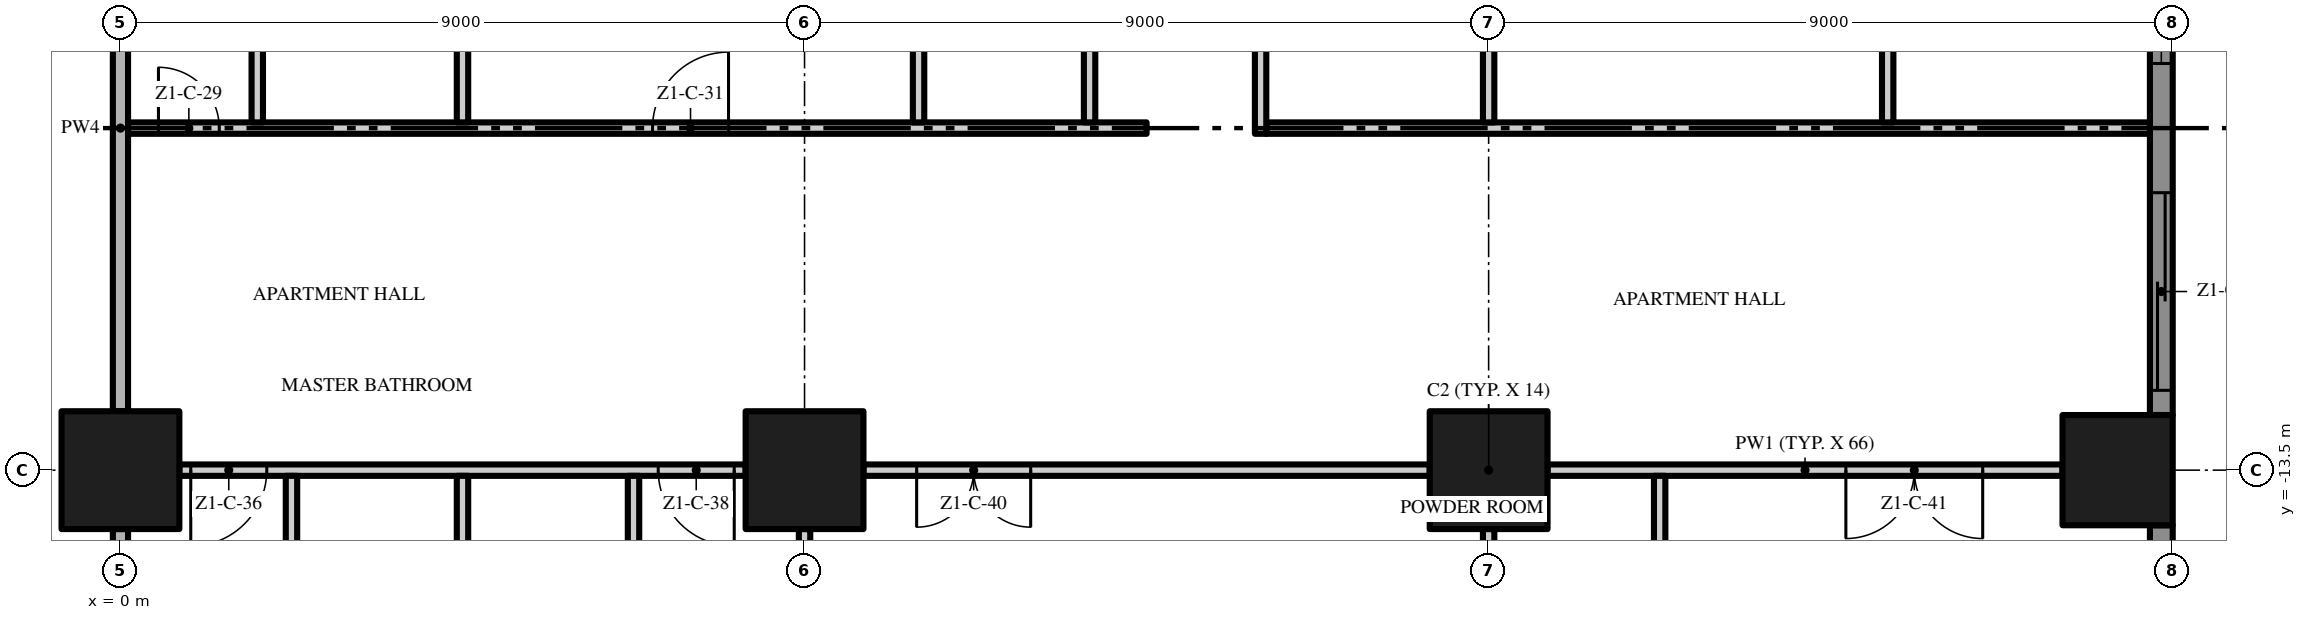
"""IFC4 building model, lengths in metres.
Left out: names, types, materials, properties, quantities, classifications, styles, units other than length and angle.
Written with IfcOpenShell. Run it as: python <this file> out.ifc"""

import sys

from ifc_helpers import new_model, si_unit, direction, frame, frame_2d, origin, origin_2d, place, context, subcontext, project, spatial, polyline, rectangle, outline, extrude, element, fill, save


model = new_model("IFC4")
c1 = context("Model", 3, precision=1e-05, world=origin(), true_north=direction((0.0, 1.0)))
c2 = subcontext(c1, "Body", "Model", "MODEL_VIEW")
j1 = project(units=[si_unit("LENGTHUNIT", "METRE"), si_unit("PLANEANGLEUNIT", "RADIAN")], contexts=[c1])
p1 = place(None, origin())
s1 = spatial("IfcSite", under=j1, at=p1, CompositionType="ELEMENT")
p2 = place(p1, origin())
s2 = spatial("IfcBuilding", under=s1, at=p2, CompositionType="ELEMENT")
p3 = place(p2, frame((0.0, 0.0, 37.8)))
s3 = spatial("IfcBuildingStorey", under=s2, at=p3, CompositionType="ELEMENT", Elevation=37.8)
for number, where, z_axis, x_axis in (
    (1, (0.0, -13.5, 0.0), (0.0, 0.0, 1.0), (1.0, 0.0, 0.0)),
    (2, (18.0, -13.5, 0.0), (0.0, 0.0, 1.0), (1.0, 0.0, 0.0)),
):
    element("IfcColumn", number, at=place(p3, frame(where, z_axis=z_axis, x_axis=x_axis)), inside=s3, PredefinedType="COLUMN", context=c2, shape_type="SweptSolid", body=[
        extrude(rectangle(XDim=1.55, YDim=1.55, at=origin_2d()), origin(), (0.0, 0.0, 1.0), 3.5),
    ])
p4 = place(p3, frame((26.275, -13.5, 0.0), z_axis=(0.0, 0.0, 1.0), x_axis=(1.0, 0.0, 0.0)))
e3 = element("IfcColumn", 3, at=p4, inside=s3, PredefinedType="COLUMN", context=c2, shape_type="SweptSolid", body=[
    extrude(rectangle(XDim=1.45, YDim=1.45, at=origin_2d()), origin(), (0.0, 0.0, 1.0), 3.5),
])
p5 = place(p3, frame((9.0, -13.5, 0.0), z_axis=(0.0, 0.0, 1.0), x_axis=(1.0, 0.0, 0.0)))
e4 = element("IfcColumn", 4, at=p5, inside=s3, PredefinedType="COLUMN", context=c2, shape_type="SweptSolid", body=[
    extrude(rectangle(XDim=1.55, YDim=1.55, at=origin_2d()), origin(), (0.0, 0.0, 1.0), 3.5),
])
p6 = place(p3, frame((26.85, -14.225, 0.0), z_axis=(0.0, 0.0, 1.0), x_axis=(0.0, -1.0, 0.0)))
e5 = element("IfcWall", 5, at=p6, inside=s3, PredefinedType="SOLIDWALL", context=c2, shape_type="SweptSolid", body=[
    extrude(rectangle(XDim=3.475, YDim=0.3, at=frame_2d((1.738, 0.0))), origin(), (0.0, 0.0, 1.0), 3.5),
])
p7 = place(p6, frame((0.325, 0.0, 0.45)))
e6 = element("IfcOpeningElement", 6, at=p7, cuts=e5, PredefinedType="OPENING", context=c2, shape_type="SweptSolid", body=[
    extrude(rectangle(XDim=2.6, YDim=2.65, at=frame_2d((1.3, 1.325))), frame((0.0, 0.16, 0.0), z_axis=(0.0, -1.0, 0.0), x_axis=(1.0, 0.0, 0.0)), (0.0, 0.0, 1.0), 0.32),
])
p8 = place(p3, frame((26.85, -5.225, 0.0), z_axis=(0.0, 0.0, 1.0), x_axis=(0.0, -1.0, 0.0)))
e7 = element("IfcWall", 7, at=p8, inside=s3, PredefinedType="SOLIDWALL", context=c2, shape_type="SweptSolid", body=[
    extrude(rectangle(XDim=7.55, YDim=0.3, at=frame_2d((3.775, 0.0))), origin(), (0.0, 0.0, 1.0), 3.5),
])
p9 = place(p8, frame((4.625, 0.0, 0.0)))
e8 = element("IfcOpeningElement", 8, at=p9, cuts=e7, PredefinedType="OPENING", context=c2, shape_type="SweptSolid", body=[
    extrude(rectangle(XDim=2.6, YDim=2.4, at=frame_2d((1.3, 1.2))), frame((0.0, 0.16, 0.0), z_axis=(0.0, -1.0, 0.0), x_axis=(1.0, 0.0, 0.0)), (0.0, 0.0, 1.0), 0.32),
])
p10 = place(p8, frame((0.325, 0.0, 0.45)))
e9 = element("IfcOpeningElement", 9, at=p10, cuts=e7, PredefinedType="OPENING", context=c2, shape_type="SweptSolid", body=[
    extrude(rectangle(XDim=2.6, YDim=2.65, at=frame_2d((1.3, 1.325))), frame((0.0, 0.16, 0.0), z_axis=(0.0, -1.0, 0.0), x_axis=(1.0, 0.0, 0.0)), (0.0, 0.0, 1.0), 0.32),
])
p11 = place(p3, origin())
e10 = element("IfcWall", 10, at=p11, inside=s3, PredefinedType="USERDEFINED", context=c2, shape_type="SweptSolid", body=[
    extrude(outline(polyline([(27.6, -18.0), (27.829, -16.5), (28.429, -15.0), (29.171, -13.5), (29.771, -12.0), (30.0, -10.5), (29.771, -9.0), (29.171, -7.5), (28.429, -6.0), (27.829, -4.5), (27.6, -3.0), (27.829, -1.5), (28.429, 0.0), (29.171, 1.5), (29.771, 3.0), (30.0, 4.5), (29.771, 6.0), (29.171, 7.5), (28.429, 9.0), (27.829, 10.5), (27.6, 12.0), (27.829, 13.5), (28.429, 15.0), (29.171, 16.5), (29.771, 18.0), (29.539, 18.093), (28.942, 16.602), (28.201, 15.102), (27.586, 13.566), (27.347, 12.0), (27.586, 10.434), (28.201, 8.898), (28.942, 7.398), (29.528, 5.934), (29.747, 4.5), (29.528, 3.066), (28.942, 1.602), (28.201, 0.102), (27.586, -1.434), (27.347, -3.0), (27.586, -4.566), (28.201, -6.102), (28.942, -7.602), (29.528, -9.066), (29.747, -10.5), (29.528, -11.934), (28.942, -13.398), (28.201, -14.898), (27.586, -16.434), (27.353, -17.962), (27.6, -18.0)])), origin(), (0.0, 0.0, 1.0), 0.9),
])
p12 = place(p3, frame((8.225, -13.5, 0.0), z_axis=(0.0, 0.0, 1.0), x_axis=(-1.0, 0.0, 0.0)))
e11 = element("IfcWall", 11, at=p12, inside=s3, PredefinedType="PARTITIONING", context=c2, shape_type="SweptSolid", body=[
    extrude(rectangle(XDim=7.45, YDim=0.15, at=frame_2d((3.725, 0.0))), origin(), (0.0, 0.0, 1.0), 3.5),
])
p13 = place(p12, frame((6.3, 0.0, 0.0)))
e12 = element("IfcOpeningElement", 12, at=p13, cuts=e11, PredefinedType="OPENING", context=c2, shape_type="SweptSolid", body=[
    extrude(rectangle(XDim=1.0, YDim=2.4, at=frame_2d((0.5, 1.2))), frame((0.0, 0.085, 0.0), z_axis=(0.0, -1.0, 0.0), x_axis=(1.0, 0.0, 0.0)), (0.0, 0.0, 1.0), 0.17),
])
p14 = place(p12, frame((0.15, 0.0, 0.0)))
e13 = element("IfcOpeningElement", 13, at=p14, cuts=e11, PredefinedType="OPENING", context=c2, shape_type="SweptSolid", body=[
    extrude(rectangle(XDim=1.0, YDim=2.4, at=frame_2d((0.5, 1.2))), frame((0.0, 0.085, 0.0), z_axis=(0.0, -1.0, 0.0), x_axis=(1.0, 0.0, 0.0)), (0.0, 0.0, 1.0), 0.17),
])
p15 = place(p3, frame((17.225, -13.5, 0.0), z_axis=(0.0, 0.0, 1.0), x_axis=(-1.0, 0.0, 0.0)))
e14 = element("IfcWall", 14, at=p15, inside=s3, PredefinedType="PARTITIONING", context=c2, shape_type="SweptSolid", body=[
    extrude(rectangle(XDim=7.45, YDim=0.15, at=frame_2d((3.725, 0.0))), origin(), (0.0, 0.0, 1.0), 3.5),
])
p16 = place(p15, frame((5.25, 0.0, 0.0)))
e15 = element("IfcOpeningElement", 15, at=p16, cuts=e14, PredefinedType="OPENING", context=c2, shape_type="SweptSolid", body=[
    extrude(rectangle(XDim=1.5, YDim=2.4, at=frame_2d((0.75, 1.2))), frame((0.0, 0.085, 0.0), z_axis=(0.0, -1.0, 0.0), x_axis=(1.0, 0.0, 0.0)), (0.0, 0.0, 1.0), 0.17),
])
p17 = place(p3, frame((25.55, -13.5, 0.0), z_axis=(0.0, 0.0, 1.0), x_axis=(-1.0, 0.0, 0.0)))
e16 = element("IfcWall", 16, at=p17, inside=s3, PredefinedType="PARTITIONING", context=c2, shape_type="SweptSolid", body=[
    extrude(rectangle(XDim=6.775, YDim=0.15, at=frame_2d((3.388, 0.0))), origin(), (0.0, 0.0, 1.0), 3.5),
])
p18 = place(p17, frame((1.05, 0.0, 0.0)))
e17 = element("IfcOpeningElement", 17, at=p18, cuts=e16, PredefinedType="OPENING", context=c2, shape_type="SweptSolid", body=[
    extrude(rectangle(XDim=1.8, YDim=2.4, at=frame_2d((0.9, 1.2))), frame((0.0, 0.085, 0.0), z_axis=(0.0, -1.0, 0.0), x_axis=(1.0, 0.0, 0.0)), (0.0, 0.0, 1.0), 0.17),
])
p19 = place(p3, frame((0.1, -9.0, 0.0), z_axis=(0.0, 0.0, 1.0), x_axis=(1.0, 0.0, 0.0)))
e18 = element("IfcWall", 18, at=p19, inside=s3, PredefinedType="PARTITIONING", context=c2, shape_type="SweptSolid", body=[
    extrude(rectangle(XDim=13.4, YDim=0.15, at=frame_2d((6.7, 0.0))), origin(), (0.0, 0.0, 1.0), 3.5),
])
p20 = place(p19, frame((0.4, 0.0, 0.0)))
e19 = element("IfcOpeningElement", 19, at=p20, cuts=e18, PredefinedType="OPENING", context=c2, shape_type="SweptSolid", body=[
    extrude(rectangle(XDim=0.8, YDim=2.0, at=frame_2d((0.4, 1.0))), frame((0.0, 0.085, 0.0), z_axis=(0.0, -1.0, 0.0), x_axis=(1.0, 0.0, 0.0)), (0.0, 0.0, 1.0), 0.17),
])
p21 = place(p19, frame((6.9, 0.0, 0.0)))
e20 = element("IfcOpeningElement", 20, at=p21, cuts=e18, PredefinedType="OPENING", context=c2, shape_type="SweptSolid", body=[
    extrude(rectangle(XDim=1.0, YDim=2.4, at=frame_2d((0.5, 1.2))), frame((0.0, 0.085, 0.0), z_axis=(0.0, -1.0, 0.0), x_axis=(1.0, 0.0, 0.0)), (0.0, 0.0, 1.0), 0.17),
])
p22 = place(p3, frame((15.075, -9.0, 0.0), z_axis=(0.0, 0.0, 1.0), x_axis=(1.0, 0.0, 0.0)))
e21 = element("IfcWall", 21, at=p22, inside=s3, PredefinedType="PARTITIONING", context=c2, shape_type="SweptSolid", body=[
    extrude(rectangle(XDim=11.625, YDim=0.15, at=frame_2d((5.812, 0.0))), origin(), (0.0, 0.0, 1.0), 3.5),
])
p23 = place(p3, frame((0.0, -21.05, 0.0), z_axis=(0.0, 0.0, 1.0), x_axis=(0.0, 1.0, 0.0)))
e22 = element("IfcWall", 22, at=p23, inside=s3, PredefinedType="PARTITIONING", context=c2, shape_type="SweptSolid", body=[
    extrude(rectangle(XDim=6.775, YDim=0.2, at=frame_2d((3.388, 0.0))), origin(), (0.0, 0.0, 1.0), 3.5),
])
p24 = place(p3, frame((0.0, -12.725, 0.0), z_axis=(0.0, 0.0, 1.0), x_axis=(0.0, 1.0, 0.0)))
e23 = element("IfcWall", 23, at=p24, inside=s3, PredefinedType="PARTITIONING", context=c2, shape_type="SweptSolid", body=[
    extrude(rectangle(XDim=7.45, YDim=0.2, at=frame_2d((3.725, 0.0))), origin(), (0.0, 0.0, 1.0), 3.5),
])
p25 = place(p3, frame((1.8, -8.925, 0.0), z_axis=(0.0, 0.0, 1.0), x_axis=(0.0, 1.0, 0.0)))
e24 = element("IfcWall", 24, at=p25, inside=s3, PredefinedType="PARTITIONING", context=c2, shape_type="SweptSolid", body=[
    extrude(rectangle(XDim=4.35, YDim=0.15, at=frame_2d((2.175, 0.0))), origin(), (0.0, 0.0, 1.0), 3.5),
])
p26 = place(p3, frame((2.25, -16.575, 0.0), z_axis=(0.0, 0.0, 1.0), x_axis=(0.0, 1.0, 0.0)))
e25 = element("IfcWall", 25, at=p26, inside=s3, PredefinedType="PARTITIONING", context=c2, shape_type="SweptSolid", body=[
    extrude(rectangle(XDim=3.0, YDim=0.15, at=frame_2d((1.5, 0.0))), origin(), (0.0, 0.0, 1.0), 3.5),
])
p27 = place(p3, frame((4.5, -22.2, 0.0), z_axis=(0.0, 0.0, 1.0), x_axis=(0.0, 1.0, 0.0)))
e26 = element("IfcWall", 26, at=p27, inside=s3, PredefinedType="PARTITIONING", context=c2, shape_type="SweptSolid", body=[
    extrude(rectangle(XDim=8.625, YDim=0.15, at=frame_2d((4.312, 0.0))), origin(), (0.0, 0.0, 1.0), 3.5),
])
p28 = place(p3, frame((4.5, -8.925, 0.0), z_axis=(0.0, 0.0, 1.0), x_axis=(0.0, 1.0, 0.0)))
e27 = element("IfcWall", 27, at=p28, inside=s3, PredefinedType="PARTITIONING", context=c2, shape_type="SweptSolid", body=[
    extrude(rectangle(XDim=4.35, YDim=0.15, at=frame_2d((2.175, 0.0))), origin(), (0.0, 0.0, 1.0), 3.5),
])
p29 = place(p3, frame((6.75, -16.575, 0.0), z_axis=(0.0, 0.0, 1.0), x_axis=(0.0, 1.0, 0.0)))
e28 = element("IfcWall", 28, at=p29, inside=s3, PredefinedType="PARTITIONING", context=c2, shape_type="SweptSolid", body=[
    extrude(rectangle(XDim=3.0, YDim=0.15, at=frame_2d((1.5, 0.0))), origin(), (0.0, 0.0, 1.0), 3.5),
])
p30 = place(p3, frame((9.0, -21.05, 0.0), z_axis=(0.0, 0.0, 1.0), x_axis=(0.0, 1.0, 0.0)))
e29 = element("IfcWall", 29, at=p30, inside=s3, PredefinedType="PARTITIONING", context=c2, shape_type="SweptSolid", body=[
    extrude(rectangle(XDim=6.775, YDim=0.15, at=frame_2d((3.388, 0.0))), origin(), (0.0, 0.0, 1.0), 3.5),
])
p31 = place(p3, frame((10.5, -8.925, 0.0), z_axis=(0.0, 0.0, 1.0), x_axis=(0.0, 1.0, 0.0)))
e30 = element("IfcWall", 30, at=p31, inside=s3, PredefinedType="PARTITIONING", context=c2, shape_type="SweptSolid", body=[
    extrude(rectangle(XDim=4.35, YDim=0.15, at=frame_2d((2.175, 0.0))), origin(), (0.0, 0.0, 1.0), 3.5),
])
p32 = place(p3, frame((12.75, -8.925, 0.0), z_axis=(0.0, 0.0, 1.0), x_axis=(0.0, 1.0, 0.0)))
e31 = element("IfcWall", 31, at=p32, inside=s3, PredefinedType="PARTITIONING", context=c2, shape_type="SweptSolid", body=[
    extrude(rectangle(XDim=4.5, YDim=0.15, at=frame_2d((2.25, 0.0))), origin(), (0.0, 0.0, 1.0), 3.5),
])
p33 = place(p32, frame((1.75, 0.0, 0.0)))
e32 = element("IfcOpeningElement", 32, at=p33, cuts=e31, PredefinedType="OPENING", context=c2, shape_type="SweptSolid", body=[
    extrude(rectangle(XDim=0.9, YDim=2.1, at=frame_2d((0.45, 1.05))), frame((0.0, 0.085, 0.0), z_axis=(0.0, -1.0, 0.0), x_axis=(1.0, 0.0, 0.0)), (0.0, 0.0, 1.0), 0.17),
])
p34 = place(p3, frame((15.0, -9.075, 0.0), z_axis=(0.0, 0.0, 1.0), x_axis=(0.0, 1.0, 0.0)))
e33 = element("IfcWall", 33, at=p34, inside=s3, PredefinedType="PARTITIONING", context=c2, shape_type="SweptSolid", body=[
    extrude(rectangle(XDim=4.65, YDim=0.15, at=frame_2d((2.325, 0.0))), origin(), (0.0, 0.0, 1.0), 3.5),
])
p35 = place(p3, frame((18.0, -21.05, 0.0), z_axis=(0.0, 0.0, 1.0), x_axis=(0.0, 1.0, 0.0)))
e34 = element("IfcWall", 34, at=p35, inside=s3, PredefinedType="PARTITIONING", context=c2, shape_type="SweptSolid", body=[
    extrude(rectangle(XDim=6.775, YDim=0.15, at=frame_2d((3.388, 0.0))), origin(), (0.0, 0.0, 1.0), 3.5),
])
p36 = place(p3, frame((18.0, -8.925, 0.0), z_axis=(0.0, 0.0, 1.0), x_axis=(0.0, 1.0, 0.0)))
e35 = element("IfcWall", 35, at=p36, inside=s3, PredefinedType="PARTITIONING", context=c2, shape_type="SweptSolid", body=[
    extrude(rectangle(XDim=3.65, YDim=0.15, at=frame_2d((1.825, 0.0))), origin(), (0.0, 0.0, 1.0), 3.5),
])
p37 = place(p3, frame((20.25, -16.575, 0.0), z_axis=(0.0, 0.0, 1.0), x_axis=(0.0, 1.0, 0.0)))
e36 = element("IfcWall", 36, at=p37, inside=s3, PredefinedType="PARTITIONING", context=c2, shape_type="SweptSolid", body=[
    extrude(rectangle(XDim=3.0, YDim=0.15, at=frame_2d((1.5, 0.0))), origin(), (0.0, 0.0, 1.0), 3.5),
])
p38 = place(p3, frame((23.25, -4.575, 0.0), z_axis=(0.0, 0.0, 1.0), x_axis=(0.0, -1.0, 0.0)))
e37 = element("IfcWall", 37, at=p38, inside=s3, PredefinedType="PARTITIONING", context=c2, shape_type="SweptSolid", body=[
    extrude(rectangle(XDim=4.35, YDim=0.15, at=frame_2d((2.175, 0.0))), origin(), (0.0, 0.0, 1.0), 3.5),
])
p39 = place(p38, frame((1.7, 0.0, 0.0)))
e38 = element("IfcOpeningElement", 38, at=p39, cuts=e37, PredefinedType="OPENING", context=c2, shape_type="SweptSolid", body=[
    extrude(rectangle(XDim=0.9, YDim=2.1, at=frame_2d((0.45, 1.05))), frame((0.0, 0.085, 0.0), z_axis=(0.0, -1.0, 0.0), x_axis=(1.0, 0.0, 0.0)), (0.0, 0.0, 1.0), 0.17),
])
p40 = place(p9, origin())
e39 = element("IfcDoor", 39, at=p40, inside=s3, OperationType="SINGLE_SWING_LEFT", PredefinedType="DOOR", context=c2, shape_type="SweptSolid", body=[
    extrude(rectangle(XDim=2.6, YDim=2.4, at=frame_2d((1.3, 1.2))), frame((0.0, 0.025, 0.0), z_axis=(0.0, -1.0, 0.0), x_axis=(1.0, 0.0, 0.0)), (0.0, 0.0, 1.0), 0.05),
])
fill(e8, e39)
p41 = place(p10, origin())
e40 = element("IfcWindow", 40, at=p41, inside=s3, PartitioningType="SINGLE_PANEL", PredefinedType="WINDOW", context=c2, shape_type="SweptSolid", body=[
    extrude(rectangle(XDim=2.6, YDim=2.65, at=frame_2d((1.3, 1.325))), frame((0.0, 0.03, 0.0), z_axis=(0.0, -1.0, 0.0), x_axis=(1.0, 0.0, 0.0)), (0.0, 0.0, 1.0), 0.06),
])
fill(e9, e40)
p42 = place(p20, origin())
e41 = element("IfcDoor", 41, at=p42, inside=s3, OperationType="SINGLE_SWING_LEFT", PredefinedType="DOOR", context=c2, shape_type="SweptSolid", body=[
    extrude(rectangle(XDim=0.8, YDim=2.0, at=frame_2d((0.4, 1.0))), frame((0.0, 0.025, 0.0), z_axis=(0.0, -1.0, 0.0), x_axis=(1.0, 0.0, 0.0)), (0.0, 0.0, 1.0), 0.05),
])
fill(e19, e41)
p43 = place(p21, origin())
e42 = element("IfcDoor", 42, at=p43, inside=s3, OperationType="SINGLE_SWING_RIGHT", PredefinedType="DOOR", context=c2, shape_type="SweptSolid", body=[
    extrude(rectangle(XDim=1.0, YDim=2.4, at=frame_2d((0.5, 1.2))), frame((0.0, 0.025, 0.0), z_axis=(0.0, -1.0, 0.0), x_axis=(1.0, 0.0, 0.0)), (0.0, 0.0, 1.0), 0.05),
])
fill(e20, e42)
p44 = place(p13, origin())
e43 = element("IfcDoor", 43, at=p44, inside=s3, OperationType="SINGLE_SWING_RIGHT", PredefinedType="DOOR", context=c2, shape_type="SweptSolid", body=[
    extrude(rectangle(XDim=1.0, YDim=2.4, at=frame_2d((0.5, 1.2))), frame((0.0, 0.025, 0.0), z_axis=(0.0, -1.0, 0.0), x_axis=(1.0, 0.0, 0.0)), (0.0, 0.0, 1.0), 0.05),
])
fill(e12, e43)
p45 = place(p14, origin())
e44 = element("IfcDoor", 44, at=p45, inside=s3, OperationType="SINGLE_SWING_LEFT", PredefinedType="DOOR", context=c2, shape_type="SweptSolid", body=[
    extrude(rectangle(XDim=1.0, YDim=2.4, at=frame_2d((0.5, 1.2))), frame((0.0, 0.025, 0.0), z_axis=(0.0, -1.0, 0.0), x_axis=(1.0, 0.0, 0.0)), (0.0, 0.0, 1.0), 0.05),
])
fill(e13, e44)
p46 = place(p16, origin())
e45 = element("IfcDoor", 45, at=p46, inside=s3, OperationType="DOUBLE_DOOR_SINGLE_SWING", PredefinedType="DOOR", context=c2, shape_type="SweptSolid", body=[
    extrude(rectangle(XDim=1.5, YDim=2.4, at=frame_2d((0.75, 1.2))), frame((0.0, 0.025, 0.0), z_axis=(0.0, -1.0, 0.0), x_axis=(1.0, 0.0, 0.0)), (0.0, 0.0, 1.0), 0.05),
])
fill(e15, e45)
p47 = place(p18, origin())
e46 = element("IfcDoor", 46, at=p47, inside=s3, OperationType="DOUBLE_DOOR_SINGLE_SWING", PredefinedType="DOOR", context=c2, shape_type="SweptSolid", body=[
    extrude(rectangle(XDim=1.8, YDim=2.4, at=frame_2d((0.9, 1.2))), frame((0.0, 0.025, 0.0), z_axis=(0.0, -1.0, 0.0), x_axis=(1.0, 0.0, 0.0)), (0.0, 0.0, 1.0), 0.05),
])
fill(e17, e46)
save(model, sys.argv[1])
